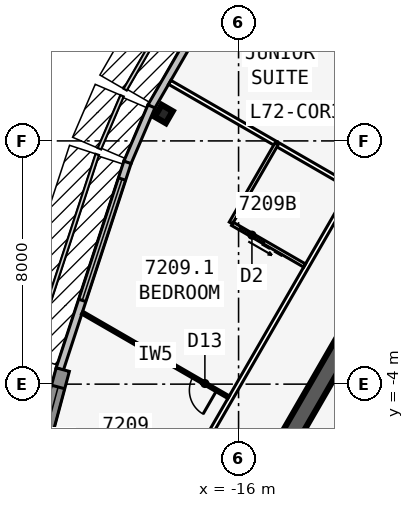
"""IFC4 building model, lengths in metres.
Left out: names, types, materials, properties, quantities, classifications, styles, units other than length and angle.
Written with IfcOpenShell. Run it as: python <this file> out.ifc"""

import sys

from ifc_helpers import new_model, si_unit, direction, frame, frame_2d, origin, origin_2d, place, context, subcontext, project, spatial, rectangle, i_section, extrude, element, fill, save


model = new_model("IFC4")
c1 = context("Model", 3, precision=1e-05, world=origin(), true_north=direction((0.0, 1.0)))
c2 = subcontext(c1, "Body", "Model", "MODEL_VIEW")
j1 = project(units=[si_unit("LENGTHUNIT", "METRE"), si_unit("PLANEANGLEUNIT", "RADIAN")], contexts=[c1])
p1 = place(None, origin())
s1 = spatial("IfcSite", under=j1, at=p1, CompositionType="ELEMENT")
p2 = place(p1, origin())
s2 = spatial("IfcBuilding", under=s1, at=p2, CompositionType="ELEMENT")
p3 = place(p2, frame((0.0, 0.0, 271.7)))
s3 = spatial("IfcBuildingStorey", under=s2, at=p3, CompositionType="ELEMENT", Elevation=271.7)
p4 = place(p3, frame((0.0, 19.052, 0.0), z_axis=(0.0, 0.0, 1.0), x_axis=(-0.499999749417, -0.866025548458, 0.0)))
e1 = element("IfcWall", 1, at=p4, inside=s3, PredefinedType="SHEAR", context=c2, shape_type="SweptSolid", body=[
    extrude(rectangle(XDim=33.0, YDim=0.6, at=frame_2d((16.5, 0.0))), origin(), (0.0, 0.0, 1.0), 3.6),
])
p5 = place(p4, frame((14.15, 0.0, 0.0)))
e2 = element("IfcOpeningElement", 2, at=p5, cuts=e1, PredefinedType="OPENING", context=c2, shape_type="SweptSolid", body=[
    extrude(rectangle(XDim=1.8, YDim=2.13, at=frame_2d((0.9, 1.065))), frame((0.0, 0.31, 0.0), z_axis=(0.0, -1.0, 0.0), x_axis=(1.0, 0.0, 0.0)), (0.0, 0.0, 1.0), 0.62),
])
p6 = place(p4, frame((12.6, 0.0, 0.0)))
e3 = element("IfcOpeningElement", 3, at=p6, cuts=e1, PredefinedType="OPENING", context=c2, shape_type="SweptSolid", body=[
    extrude(rectangle(XDim=1.0, YDim=2.13, at=frame_2d((0.5, 1.065))), frame((0.0, 0.31, 0.0), z_axis=(0.0, -1.0, 0.0), x_axis=(1.0, 0.0, 0.0)), (0.0, 0.0, 1.0), 0.62),
])
p7 = place(p3, frame((-18.461, 4.885, 0.0), z_axis=(0.0, 0.0, 1.0), x_axis=(-0.866025403784, 0.5, 0.0)))
e4 = element("IfcColumn", 4, at=p7, inside=s3, PredefinedType="COLUMN", context=c2, shape_type="SweptSolid", body=[
    extrude(i_section(OverallWidth=0.419, OverallDepth=0.455, WebThickness=0.042, FlangeThickness=0.068, at=origin_2d()), origin(), (0.0, 0.0, 1.0), 3.6),
])
p8 = place(p3, frame((-13.873, 13.783, 0.0), z_axis=(0.0, 0.0, 1.0), x_axis=(-0.499993662806, -0.866029062534, 0.0)))
e5 = element("IfcWall", 5, at=p8, inside=s3, PredefinedType="STANDARD", context=c2, shape_type="SweptSolid", body=[
    extrude(rectangle(XDim=10.0, YDim=0.25, at=frame_2d((5.0, 0.0))), origin(), (0.0, 0.0, 1.0), 3.35),
])
p9 = place(p8, frame((2.9, 0.0, 0.45)))
e6 = element("IfcOpeningElement", 6, at=p9, cuts=e5, PredefinedType="OPENING", context=c2, shape_type="SweptSolid", body=[
    extrude(rectangle(XDim=4.2, YDim=2.6, at=frame_2d((2.1, 1.3))), frame((0.0, 0.135, 0.0), z_axis=(0.0, -1.0, 0.0), x_axis=(1.0, 0.0, 0.0)), (0.0, 0.0, 1.0), 0.27),
])
p10 = place(p3, frame((-18.866, 5.136, 0.0), z_axis=(0.0, 0.0, 1.0), x_axis=(-0.393290226175, -0.91941437774, 0.0)))
e7 = element("IfcWall", 7, at=p10, inside=s3, PredefinedType="STANDARD", context=c2, shape_type="SweptSolid", body=[
    extrude(rectangle(XDim=2.014, YDim=0.25, at=frame_2d((1.007, 0.0))), origin(), (0.0, 0.0, 1.0), 3.35),
])
p11 = place(p3, frame((-19.654, 3.294, 0.0), z_axis=(0.0, 0.0, 1.0), x_axis=(-0.311328857048, -0.95030223759, 0.0)))
e8 = element("IfcWall", 8, at=p11, inside=s3, PredefinedType="STANDARD", context=c2, shape_type="SweptSolid", body=[
    extrude(rectangle(XDim=7.153, YDim=0.25, at=frame_2d((3.576, 0.0))), origin(), (0.0, 0.0, 1.0), 3.35),
])
p12 = place(p11, frame((0.577, 0.0, 0.45)))
e9 = element("IfcOpeningElement", 9, at=p12, cuts=e8, PredefinedType="OPENING", context=c2, shape_type="SweptSolid", body=[
    extrude(rectangle(XDim=4.2, YDim=2.6, at=frame_2d((2.1, 1.3))), frame((0.0, 0.135, 0.0), z_axis=(0.0, -1.0, 0.0), x_axis=(1.0, 0.0, 0.0)), (0.0, 0.0, 1.0), 0.27),
])
p13 = place(p3, frame((-21.783, -3.522, 0.0), z_axis=(0.0, 0.0, 1.0), x_axis=(-0.25880328844, -0.965930048136, 0.0)))
e10 = element("IfcWall", 10, at=p13, inside=s3, PredefinedType="SOLIDWALL", context=c2, shape_type="SweptSolid", body=[
    extrude(rectangle(XDim=4.782, YDim=0.45, at=frame_2d((2.391, 0.0))), origin(), (0.0, 0.0, 1.0), 3.35),
])
p14 = place(p13, frame((0.591, 0.0, 0.45)))
e11 = element("IfcOpeningElement", 11, at=p14, cuts=e10, PredefinedType="OPENING", context=c2, shape_type="SweptSolid", body=[
    extrude(rectangle(XDim=3.6, YDim=2.6, at=frame_2d((1.8, 1.3))), frame((0.0, 0.235, 0.0), z_axis=(0.0, -1.0, 0.0), x_axis=(1.0, 0.0, 0.0)), (0.0, 0.0, 1.0), 0.47),
])
p15 = place(p3, frame((-0.35, 23.096, 0.0), z_axis=(0.0, 0.0, 1.0), x_axis=(-0.499998875317, -0.866026053119, 0.0)))
e12 = element("IfcWall", 12, at=p15, inside=s3, PredefinedType="PARTITIONING", context=c2, shape_type="SweptSolid", body=[
    extrude(rectangle(XDim=39.654, YDim=0.15, at=frame_2d((19.827, 0.0))), origin(), (0.0, 0.0, 1.0), 3.35),
])
p16 = place(p15, frame((3.272, 0.0, 0.0)))
e13 = element("IfcOpeningElement", 13, at=p16, cuts=e12, PredefinedType="OPENING", context=c2, shape_type="SweptSolid", body=[
    extrude(rectangle(XDim=0.95, YDim=2.13, at=frame_2d((0.475, 1.065))), frame((0.0, 0.085, 0.0), z_axis=(0.0, -1.0, 0.0), x_axis=(1.0, 0.0, 0.0)), (0.0, 0.0, 1.0), 0.17),
])
p17 = place(p15, frame((19.052, 0.0, 0.0)))
e14 = element("IfcOpeningElement", 14, at=p17, cuts=e12, PredefinedType="OPENING", context=c2, shape_type="SweptSolid", body=[
    extrude(rectangle(XDim=0.95, YDim=2.13, at=frame_2d((0.475, 1.065))), frame((0.0, 0.085, 0.0), z_axis=(0.0, -1.0, 0.0), x_axis=(1.0, 0.0, 0.0)), (0.0, 0.0, 1.0), 0.17),
])
p18 = place(p15, frame((35.432, 0.0, 0.0)))
e15 = element("IfcOpeningElement", 15, at=p18, cuts=e12, PredefinedType="OPENING", context=c2, shape_type="SweptSolid", body=[
    extrude(rectangle(XDim=0.95, YDim=2.13, at=frame_2d((0.475, 1.065))), frame((0.0, 0.085, 0.0), z_axis=(0.0, -1.0, 0.0), x_axis=(1.0, 0.0, 0.0)), (0.0, 0.0, 1.0), 0.17),
])
p19 = place(p3, frame((-12.329, 2.499, 0.0), z_axis=(0.0, 0.0, 1.0), x_axis=(-0.866027209835, 0.499996871816, 0.0)))
e16 = element("IfcWall", 16, at=p19, inside=s3, PredefinedType="PARTITIONING", context=c2, shape_type="SweptSolid", body=[
    extrude(rectangle(XDim=6.854, YDim=0.15, at=frame_2d((3.427, 0.0))), origin(), (0.0, 0.0, 1.0), 3.35),
])
p20 = place(p3, frame((-16.329, -4.429, 0.0), z_axis=(0.0, 0.0, 1.0), x_axis=(-0.866029066823, 0.499993655377, 0.0)))
e17 = element("IfcWall", 17, at=p20, inside=s3, PredefinedType="PARTITIONING", context=c2, shape_type="SweptSolid", body=[
    extrude(rectangle(XDim=5.559, YDim=0.1, at=frame_2d((2.779, 0.0))), origin(), (0.0, 0.0, 1.0), 2.301),
])
p21 = place(p20, frame((0.45, 0.0, 0.0)))
e18 = element("IfcOpeningElement", 18, at=p21, cuts=e17, PredefinedType="OPENING", context=c2, shape_type="SweptSolid", body=[
    extrude(rectangle(XDim=0.9, YDim=2.13, at=frame_2d((0.45, 1.065))), frame((0.0, 0.06, 0.0), z_axis=(0.0, -1.0, 0.0), x_axis=(1.0, 0.0, 0.0)), (0.0, 0.0, 1.0), 0.12),
])
p22 = place(p3, frame((-14.753, 3.899, 0.0), z_axis=(0.0, 0.0, 1.0), x_axis=(-0.50002537861, -0.866010750942, 0.0)))
e19 = element("IfcWall", 19, at=p22, inside=s3, PredefinedType="PLUMBINGWALL", context=c2, shape_type="SweptSolid", body=[
    extrude(rectangle(XDim=3.0, YDim=0.12, at=frame_2d((1.5, 0.0))), origin(), (0.0, 0.0, 1.0), 3.35),
])
p23 = place(p3, frame((-13.829, -0.099, 0.0), z_axis=(0.0, 0.0, 1.0), x_axis=(-0.865997131366, 0.500048966069, 0.0)))
e20 = element("IfcWall", 20, at=p23, inside=s3, PredefinedType="PLUMBINGWALL", context=c2, shape_type="SweptSolid", body=[
    extrude(rectangle(XDim=2.74, YDim=0.12, at=frame_2d((1.37, 0.0))), origin(), (0.0, 0.0, 1.0), 2.309),
])
p24 = place(p23, frame((1.55, 0.0, 0.0)))
e21 = element("IfcOpeningElement", 21, at=p24, cuts=e20, PredefinedType="OPENING", context=c2, shape_type="SweptSolid", body=[
    extrude(rectangle(XDim=0.9, YDim=2.13, at=frame_2d((0.45, 1.065))), frame((0.0, 0.07, 0.0), z_axis=(0.0, -1.0, 0.0), x_axis=(1.0, 0.0, 0.0)), (0.0, 0.0, 1.0), 0.14),
])
p25 = place(p12, origin())
e22 = element("IfcWindow", 22, at=p25, inside=s3, PartitioningType="SINGLE_PANEL", PredefinedType="WINDOW", context=c2, shape_type="SweptSolid", body=[
    extrude(rectangle(XDim=4.2, YDim=2.6, at=frame_2d((2.1, 1.3))), frame((0.0, 0.03, 0.0), z_axis=(0.0, -1.0, 0.0), x_axis=(1.0, 0.0, 0.0)), (0.0, 0.0, 1.0), 0.06),
])
fill(e9, e22)
p26 = place(p14, origin())
e23 = element("IfcWindow", 23, at=p26, inside=s3, PartitioningType="SINGLE_PANEL", PredefinedType="WINDOW", context=c2, shape_type="SweptSolid", body=[
    extrude(rectangle(XDim=3.6, YDim=2.6, at=frame_2d((1.8, 1.3))), frame((0.0, 0.03, 0.0), z_axis=(0.0, -1.0, 0.0), x_axis=(1.0, 0.0, 0.0)), (0.0, 0.0, 1.0), 0.06),
])
fill(e11, e23)
p27 = place(p21, origin())
e24 = element("IfcDoor", 24, at=p27, inside=s3, OperationType="SINGLE_SWING_LEFT", PredefinedType="DOOR", context=c2, shape_type="SweptSolid", body=[
    extrude(rectangle(XDim=0.9, YDim=2.13, at=frame_2d((0.45, 1.065))), frame((0.0, 0.025, 0.0), z_axis=(0.0, -1.0, 0.0), x_axis=(1.0, 0.0, 0.0)), (0.0, 0.0, 1.0), 0.05),
])
fill(e18, e24)
p28 = place(p24, origin())
e25 = element("IfcDoor", 25, at=p28, inside=s3, OperationType="SLIDING_TO_LEFT", PredefinedType="DOOR", context=c2, shape_type="SweptSolid", body=[
    extrude(rectangle(XDim=0.9, YDim=2.13, at=frame_2d((0.45, 1.065))), frame((0.0, 0.025, 0.0), z_axis=(0.0, -1.0, 0.0), x_axis=(1.0, 0.0, 0.0)), (0.0, 0.0, 1.0), 0.05),
])
fill(e21, e25)
save(model, sys.argv[1])
